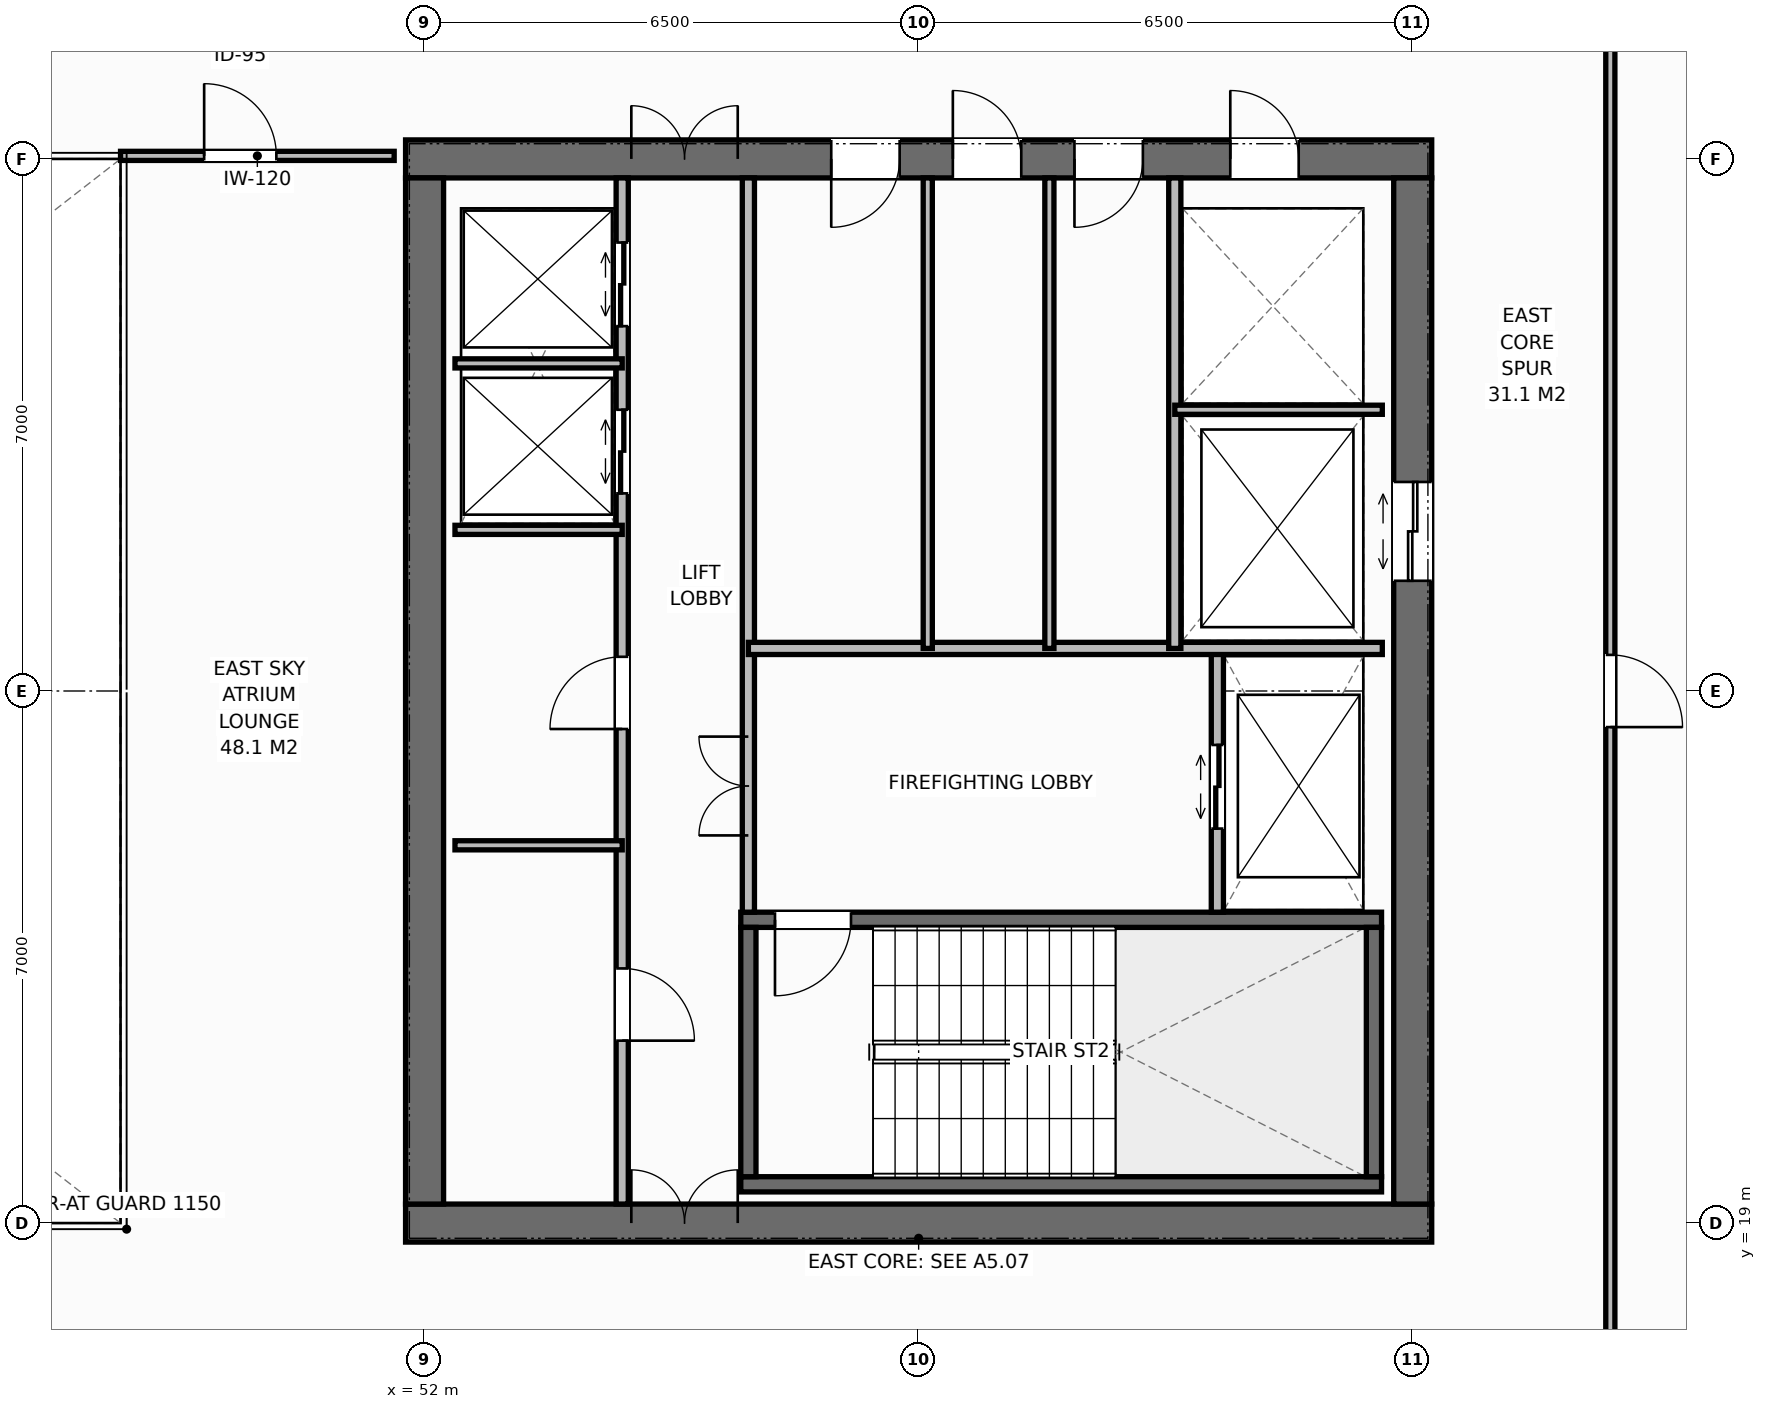
"""IFC4 building model, lengths in metres.
Left out: names, types, materials, properties, quantities, classifications, styles, units other than length and angle.
Written with IfcOpenShell. Run it as: python <this file> out.ifc"""

import sys

from ifc_helpers import new_model, si_unit, direction, frame, frame_2d, origin, place, context, subcontext, project, spatial, rectangle, extrude, element, fill, save


model = new_model("IFC4")
c1 = context("Model", 3, precision=1e-05, world=origin(), true_north=direction((0.0, 1.0)))
c2 = subcontext(c1, "Body", "Model", "MODEL_VIEW")
j1 = project(units=[si_unit("LENGTHUNIT", "METRE"), si_unit("PLANEANGLEUNIT", "RADIAN")], contexts=[c1])
p1 = place(None, origin())
s1 = spatial("IfcSite", under=j1, at=p1, CompositionType="ELEMENT")
p2 = place(p1, origin())
s2 = spatial("IfcBuilding", under=s1, at=p2, CompositionType="ELEMENT")
p3 = place(p2, frame((0.0, 0.0, 278.4)))
s3 = spatial("IfcBuildingStorey", under=s2, at=p3, CompositionType="ELEMENT", Elevation=278.4)
p4 = place(p3, frame((51.75, 19.0, 0.0), z_axis=(0.0, 0.0, 1.0), x_axis=(1.0, 0.0, 0.0)))
e1 = element("IfcWall", 1, at=p4, inside=s3, PredefinedType="SHEAR", context=c2, shape_type="SweptSolid", body=[
    extrude(rectangle(XDim=13.5, YDim=0.5, at=frame_2d((6.75, 0.0))), origin(), (0.0, 0.0, 1.0), 4.0),
])
p5 = place(p4, frame((2.97, 0.0, 0.0)))
e2 = element("IfcOpeningElement", 2, at=p5, cuts=e1, PredefinedType="OPENING", context=c2, shape_type="SweptSolid", body=[
    extrude(rectangle(XDim=1.4, YDim=2.2, at=frame_2d((0.7, 1.1))), frame((0.0, 0.26, 0.0), z_axis=(0.0, -1.0, 0.0), x_axis=(1.0, 0.0, 0.0)), (0.0, 0.0, 1.0), 0.52),
])
p6 = place(p3, frame((51.75, 33.0, 0.0), z_axis=(0.0, 0.0, 1.0), x_axis=(1.0, 0.0, 0.0)))
e3 = element("IfcWall", 3, at=p6, inside=s3, PredefinedType="SHEAR", context=c2, shape_type="SweptSolid", body=[
    extrude(rectangle(XDim=13.5, YDim=0.5, at=frame_2d((6.75, 0.0))), origin(), (0.0, 0.0, 1.0), 4.0),
])
p7 = place(p6, frame((2.97, 0.0, 0.0)))
e4 = element("IfcOpeningElement", 4, at=p7, cuts=e3, PredefinedType="OPENING", context=c2, shape_type="SweptSolid", body=[
    extrude(rectangle(XDim=1.4, YDim=2.2, at=frame_2d((0.7, 1.1))), frame((0.0, 0.26, 0.0), z_axis=(0.0, -1.0, 0.0), x_axis=(1.0, 0.0, 0.0)), (0.0, 0.0, 1.0), 0.52),
])
p8 = place(p6, frame((10.85, 0.0, 0.0)))
e5 = element("IfcOpeningElement", 5, at=p8, cuts=e3, PredefinedType="OPENING", context=c2, shape_type="SweptSolid", body=[
    extrude(rectangle(XDim=0.9, YDim=2.15, at=frame_2d((0.45, 1.075))), frame((0.0, 0.26, 0.0), z_axis=(0.0, -1.0, 0.0), x_axis=(1.0, 0.0, 0.0)), (0.0, 0.0, 1.0), 0.52),
])
p9 = place(p6, frame((5.6, 0.0, 0.0)))
e6 = element("IfcOpeningElement", 6, at=p9, cuts=e3, PredefinedType="OPENING", context=c2, shape_type="SweptSolid", body=[
    extrude(rectangle(XDim=0.9, YDim=2.15, at=frame_2d((0.45, 1.075))), frame((0.0, 0.26, 0.0), z_axis=(0.0, -1.0, 0.0), x_axis=(1.0, 0.0, 0.0)), (0.0, 0.0, 1.0), 0.52),
])
p10 = place(p6, frame((7.2, 0.0, 0.0)))
e7 = element("IfcOpeningElement", 7, at=p10, cuts=e3, PredefinedType="OPENING", context=c2, shape_type="SweptSolid", body=[
    extrude(rectangle(XDim=0.9, YDim=2.15, at=frame_2d((0.45, 1.075))), frame((0.0, 0.26, 0.0), z_axis=(0.0, -1.0, 0.0), x_axis=(1.0, 0.0, 0.0)), (0.0, 0.0, 1.0), 0.52),
])
p11 = place(p6, frame((8.8, 0.0, 0.0)))
e8 = element("IfcOpeningElement", 8, at=p11, cuts=e3, PredefinedType="OPENING", context=c2, shape_type="SweptSolid", body=[
    extrude(rectangle(XDim=0.9, YDim=2.15, at=frame_2d((0.45, 1.075))), frame((0.0, 0.26, 0.0), z_axis=(0.0, -1.0, 0.0), x_axis=(1.0, 0.0, 0.0)), (0.0, 0.0, 1.0), 0.52),
])
p12 = place(p3, frame((52.0, 19.25, 0.0), z_axis=(0.0, 0.0, 1.0), x_axis=(0.0, 1.0, 0.0)))
e9 = element("IfcWall", 9, at=p12, inside=s3, PredefinedType="SHEAR", context=c2, shape_type="SweptSolid", body=[
    extrude(rectangle(XDim=13.5, YDim=0.5, at=frame_2d((6.75, 0.0))), origin(), (0.0, 0.0, 1.0), 4.0),
])
p13 = place(p3, frame((65.0, 19.25, 0.0), z_axis=(0.0, 0.0, 1.0), x_axis=(0.0, 1.0, 0.0)))
e10 = element("IfcWall", 10, at=p13, inside=s3, PredefinedType="SHEAR", context=c2, shape_type="SweptSolid", body=[
    extrude(rectangle(XDim=13.5, YDim=0.5, at=frame_2d((6.75, 0.0))), origin(), (0.0, 0.0, 1.0), 4.0),
])
p14 = place(p13, frame((8.2, 0.0, 0.0)))
e11 = element("IfcOpeningElement", 11, at=p14, cuts=e10, PredefinedType="OPENING", context=c2, shape_type="SweptSolid", body=[
    extrude(rectangle(XDim=1.3, YDim=2.2, at=frame_2d((0.65, 1.1))), frame((0.0, 0.26, 0.0), z_axis=(0.0, -1.0, 0.0), x_axis=(1.0, 0.0, 0.0)), (0.0, 0.0, 1.0), 0.52),
])
p15 = place(p3, frame((56.16, 19.51, 0.0), z_axis=(0.0, 0.0, 1.0), x_axis=(1.0, 0.0, 0.0)))
e12 = element("IfcWall", 12, at=p15, inside=s3, PredefinedType="SHEAR", context=c2, shape_type="SweptSolid", body=[
    extrude(rectangle(XDim=8.43, YDim=0.2, at=frame_2d((4.215, 0.0))), origin(), (0.0, 0.0, 1.0), 4.0),
])
p16 = place(p3, frame((56.16, 22.99, 0.0), z_axis=(0.0, 0.0, 1.0), x_axis=(1.0, 0.0, 0.0)))
e13 = element("IfcWall", 13, at=p16, inside=s3, PredefinedType="SHEAR", context=c2, shape_type="SweptSolid", body=[
    extrude(rectangle(XDim=8.43, YDim=0.2, at=frame_2d((4.215, 0.0))), origin(), (0.0, 0.0, 1.0), 4.0),
])
p17 = place(p16, frame((0.45, 0.0, 0.0)))
e14 = element("IfcOpeningElement", 14, at=p17, cuts=e13, PredefinedType="OPENING", context=c2, shape_type="SweptSolid", body=[
    extrude(rectangle(XDim=1.0, YDim=2.15, at=frame_2d((0.5, 1.075))), frame((0.0, 0.11, 0.0), z_axis=(0.0, -1.0, 0.0), x_axis=(1.0, 0.0, 0.0)), (0.0, 0.0, 1.0), 0.22),
])
for number, where, z_axis, x_axis in (
    (15, (56.26, 19.61, 0.0), (0.0, 0.0, 1.0), (0.0, 1.0, 0.0)),
    (16, (64.49, 19.61, 0.0), (0.0, 0.0, 1.0), (0.0, 1.0, 0.0)),
):
    element("IfcWall", number, at=place(p3, frame(where, z_axis=z_axis, x_axis=x_axis)), inside=s3, PredefinedType="SHEAR", context=c2, shape_type="SweptSolid", body=[
        extrude(rectangle(XDim=3.28, YDim=0.2, at=frame_2d((1.64, 0.0))), origin(), (0.0, 0.0, 1.0), 4.0),
    ])
p18 = place(p3, frame((54.6, 19.25, 0.0), z_axis=(0.0, 0.0, 1.0), x_axis=(0.0, 1.0, 0.0)))
e17 = element("IfcWall", 17, at=p18, inside=s3, PredefinedType="STANDARD", context=c2, shape_type="SweptSolid", body=[
    extrude(rectangle(XDim=13.5, YDim=0.16, at=frame_2d((6.75, 0.0))), origin(), (0.0, 0.0, 1.0), 3.788),
])
p19 = place(p18, frame((2.15, 0.0, 0.0)))
e18 = element("IfcOpeningElement", 18, at=p19, cuts=e17, PredefinedType="OPENING", context=c2, shape_type="SweptSolid", body=[
    extrude(rectangle(XDim=0.95, YDim=2.15, at=frame_2d((0.475, 1.075))), frame((0.0, 0.09, 0.0), z_axis=(0.0, -1.0, 0.0), x_axis=(1.0, 0.0, 0.0)), (0.0, 0.0, 1.0), 0.18),
])
p20 = place(p18, frame((6.25, 0.0, 0.0)))
e19 = element("IfcOpeningElement", 19, at=p20, cuts=e17, PredefinedType="OPENING", context=c2, shape_type="SweptSolid", body=[
    extrude(rectangle(XDim=0.95, YDim=2.15, at=frame_2d((0.475, 1.075))), frame((0.0, 0.09, 0.0), z_axis=(0.0, -1.0, 0.0), x_axis=(1.0, 0.0, 0.0)), (0.0, 0.0, 1.0), 0.18),
])
p21 = place(p18, frame((9.35, 0.0, 0.0)))
e20 = element("IfcOpeningElement", 20, at=p21, cuts=e17, PredefinedType="OPENING", context=c2, shape_type="SweptSolid", body=[
    extrude(rectangle(XDim=1.1, YDim=2.2, at=frame_2d((0.55, 1.1))), frame((0.0, 0.09, 0.0), z_axis=(0.0, -1.0, 0.0), x_axis=(1.0, 0.0, 0.0)), (0.0, 0.0, 1.0), 0.18),
])
p22 = place(p18, frame((11.55, 0.0, 0.0)))
e21 = element("IfcOpeningElement", 21, at=p22, cuts=e17, PredefinedType="OPENING", context=c2, shape_type="SweptSolid", body=[
    extrude(rectangle(XDim=1.1, YDim=2.2, at=frame_2d((0.55, 1.1))), frame((0.0, 0.09, 0.0), z_axis=(0.0, -1.0, 0.0), x_axis=(1.0, 0.0, 0.0)), (0.0, 0.0, 1.0), 0.18),
])
p23 = place(p3, frame((56.26, 23.09, 0.0), z_axis=(0.0, 0.0, 1.0), x_axis=(0.0, 1.0, 0.0)))
e22 = element("IfcWall", 22, at=p23, inside=s3, PredefinedType="STANDARD", context=c2, shape_type="SweptSolid", body=[
    extrude(rectangle(XDim=9.66, YDim=0.16, at=frame_2d((4.83, 0.0))), origin(), (0.0, 0.0, 1.0), 3.788),
])
p24 = place(p23, frame((1.01, 0.0, 0.0)))
e23 = element("IfcOpeningElement", 23, at=p24, cuts=e22, PredefinedType="OPENING", context=c2, shape_type="SweptSolid", body=[
    extrude(rectangle(XDim=1.3, YDim=2.2, at=frame_2d((0.65, 1.1))), frame((0.0, 0.09, 0.0), z_axis=(0.0, -1.0, 0.0), x_axis=(1.0, 0.0, 0.0)), (0.0, 0.0, 1.0), 0.18),
])
for number, where, z_axis, x_axis in (
    (24, (52.4, 23.97, 0.0), (0.0, 0.0, 1.0), (1.0, 0.0, 0.0)),
    (25, (52.4, 28.12, 0.0), (0.0, 0.0, 1.0), (1.0, 0.0, 0.0)),
    (26, (52.4, 30.31, 0.0), (0.0, 0.0, 1.0), (1.0, 0.0, 0.0)),
):
    element("IfcWall", number, at=place(p3, frame(where, z_axis=z_axis, x_axis=x_axis)), inside=s3, PredefinedType="PARTITIONING", context=c2, shape_type="SweptSolid", body=[
        extrude(rectangle(XDim=2.2, YDim=0.12, at=frame_2d((1.1, 0.0))), origin(), (0.0, 0.0, 1.0), 3.788),
    ])
p25 = place(p3, frame((62.43, 23.09, 0.0), z_axis=(0.0, 0.0, 1.0), x_axis=(0.0, 1.0, 0.0)))
e27 = element("IfcWall", 27, at=p25, inside=s3, PredefinedType="STANDARD", context=c2, shape_type="SweptSolid", body=[
    extrude(rectangle(XDim=3.47, YDim=0.16, at=frame_2d((1.735, 0.0))), origin(), (0.0, 0.0, 1.0), 3.788),
])
p26 = place(p25, frame((1.1, 0.0, 0.0)))
e28 = element("IfcOpeningElement", 28, at=p26, cuts=e27, PredefinedType="OPENING", context=c2, shape_type="SweptSolid", body=[
    extrude(rectangle(XDim=1.1, YDim=2.2, at=frame_2d((0.55, 1.1))), frame((0.0, 0.09, 0.0), z_axis=(0.0, -1.0, 0.0), x_axis=(1.0, 0.0, 0.0)), (0.0, 0.0, 1.0), 0.18),
])
p27 = place(p3, frame((56.26, 26.56, 0.0), z_axis=(0.0, 0.0, 1.0), x_axis=(1.0, 0.0, 0.0)))
e29 = element("IfcWall", 29, at=p27, inside=s3, PredefinedType="STANDARD", context=c2, shape_type="SweptSolid", body=[
    extrude(rectangle(XDim=8.34, YDim=0.16, at=frame_2d((4.17, 0.0))), origin(), (0.0, 0.0, 1.0), 3.788),
])
p28 = place(p3, frame((61.87, 26.56, 0.0), z_axis=(0.0, 0.0, 1.0), x_axis=(0.0, 1.0, 0.0)))
e30 = element("IfcWall", 30, at=p28, inside=s3, PredefinedType="STANDARD", context=c2, shape_type="SweptSolid", body=[
    extrude(rectangle(XDim=6.19, YDim=0.16, at=frame_2d((3.095, 0.0))), origin(), (0.0, 0.0, 1.0), 3.788),
])
p29 = place(p3, frame((61.87, 29.7, 0.0), z_axis=(0.0, 0.0, 1.0), x_axis=(1.0, 0.0, 0.0)))
e31 = element("IfcWall", 31, at=p29, inside=s3, PredefinedType="PARTITIONING", context=c2, shape_type="SweptSolid", body=[
    extrude(rectangle(XDim=2.73, YDim=0.12, at=frame_2d((1.365, 0.0))), origin(), (0.0, 0.0, 1.0), 3.788),
])
for number, where, z_axis, x_axis in (
    (32, (58.62, 26.56, 0.0), (0.0, 0.0, 1.0), (0.0, 1.0, 0.0)),
    (33, (60.22, 26.56, 0.0), (0.0, 0.0, 1.0), (0.0, 1.0, 0.0)),
):
    element("IfcWall", number, at=place(p3, frame(where, z_axis=z_axis, x_axis=x_axis)), inside=s3, PredefinedType="PARTITIONING", context=c2, shape_type="SweptSolid", body=[
        extrude(rectangle(XDim=6.19, YDim=0.12, at=frame_2d((3.095, 0.0))), origin(), (0.0, 0.0, 1.0), 3.788),
    ])
p30 = place(p3, frame((48.0, 33.04, 0.0), z_axis=(0.0, 0.0, 1.0), x_axis=(1.0, 0.0, 0.0)))
e34 = element("IfcWall", 34, at=p30, inside=s3, PredefinedType="PARTITIONING", context=c2, shape_type="SweptSolid", body=[
    extrude(rectangle(XDim=3.6, YDim=0.12, at=frame_2d((1.8, 0.0))), origin(), (0.0, 0.0, 1.0), 3.528),
])
p31 = place(p30, frame((1.1, 0.0, 0.0)))
e35 = element("IfcOpeningElement", 35, at=p31, cuts=e34, PredefinedType="OPENING", context=c2, shape_type="SweptSolid", body=[
    extrude(rectangle(XDim=0.95, YDim=2.15, at=frame_2d((0.475, 1.075))), frame((0.0, 0.07, 0.0), z_axis=(0.0, -1.0, 0.0), x_axis=(1.0, 0.0, 0.0)), (0.0, 0.0, 1.0), 0.14),
])
p32 = place(p3, frame((67.6, 16.5, 0.0), z_axis=(0.0, 0.0, 1.0), x_axis=(0.0, 1.0, 0.0)))
e36 = element("IfcWall", 36, at=p32, inside=s3, PredefinedType="PARTITIONING", context=c2, shape_type="SweptSolid", body=[
    extrude(rectangle(XDim=19.0, YDim=0.12, at=frame_2d((9.5, 0.0))), origin(), (0.0, 0.0, 1.0), 3.788),
])
p33 = place(p32, frame((9.025, 0.0, 0.0)))
e37 = element("IfcOpeningElement", 37, at=p33, cuts=e36, PredefinedType="OPENING", context=c2, shape_type="SweptSolid", body=[
    extrude(rectangle(XDim=0.95, YDim=2.15, at=frame_2d((0.475, 1.075))), frame((0.0, 0.07, 0.0), z_axis=(0.0, -1.0, 0.0), x_axis=(1.0, 0.0, 0.0)), (0.0, 0.0, 1.0), 0.14),
])
p34 = place(p5, origin())
e38 = element("IfcDoor", 38, at=p34, inside=s3, OperationType="DOUBLE_DOOR_SINGLE_SWING", PredefinedType="DOOR", context=c2, shape_type="SweptSolid", body=[
    extrude(rectangle(XDim=1.4, YDim=2.2, at=frame_2d((0.7, 1.1))), frame((0.0, 0.075, 0.0), z_axis=(0.0, -1.0, 0.0), x_axis=(1.0, 0.0, 0.0)), (0.0, 0.0, 1.0), 0.05),
])
fill(e2, e38)
p35 = place(p7, origin())
e39 = element("IfcDoor", 39, at=p35, inside=s3, OperationType="DOUBLE_DOOR_SINGLE_SWING", PredefinedType="DOOR", context=c2, shape_type="SweptSolid", body=[
    extrude(rectangle(XDim=1.4, YDim=2.2, at=frame_2d((0.7, 1.1))), frame((0.0, -0.025, 0.0), z_axis=(0.0, -1.0, 0.0), x_axis=(1.0, 0.0, 0.0)), (0.0, 0.0, 1.0), 0.05),
])
fill(e4, e39)
p36 = place(p19, origin())
e40 = element("IfcDoor", 40, at=p36, inside=s3, OperationType="SINGLE_SWING_RIGHT", PredefinedType="DOOR", context=c2, shape_type="SweptSolid", body=[
    extrude(rectangle(XDim=0.95, YDim=2.15, at=frame_2d((0.475, 1.075))), frame((0.0, 0.025, 0.0), z_axis=(0.0, -1.0, 0.0), x_axis=(1.0, 0.0, 0.0)), (0.0, 0.0, 1.0), 0.05),
])
fill(e18, e40)
p37 = place(p20, origin())
e41 = element("IfcDoor", 41, at=p37, inside=s3, OperationType="SINGLE_SWING_LEFT", PredefinedType="DOOR", context=c2, shape_type="SweptSolid", body=[
    extrude(rectangle(XDim=0.95, YDim=2.15, at=frame_2d((0.475, 1.075))), frame((0.0, 0.025, 0.0), z_axis=(0.0, -1.0, 0.0), x_axis=(1.0, 0.0, 0.0)), (0.0, 0.0, 1.0), 0.05),
])
fill(e19, e41)
p38 = place(p21, origin())
e42 = element("IfcDoor", 42, at=p38, inside=s3, OperationType="DOUBLE_DOOR_SLIDING", PredefinedType="DOOR", context=c2, shape_type="SweptSolid", body=[
    extrude(rectangle(XDim=1.1, YDim=2.2, at=frame_2d((0.55, 1.1))), frame((0.0, 0.025, 0.0), z_axis=(0.0, -1.0, 0.0), x_axis=(1.0, 0.0, 0.0)), (0.0, 0.0, 1.0), 0.05),
])
fill(e20, e42)
p39 = place(p22, origin())
e43 = element("IfcDoor", 43, at=p39, inside=s3, OperationType="DOUBLE_DOOR_SLIDING", PredefinedType="DOOR", context=c2, shape_type="SweptSolid", body=[
    extrude(rectangle(XDim=1.1, YDim=2.2, at=frame_2d((0.55, 1.1))), frame((0.0, 0.025, 0.0), z_axis=(0.0, -1.0, 0.0), x_axis=(1.0, 0.0, 0.0)), (0.0, 0.0, 1.0), 0.05),
])
fill(e21, e43)
p40 = place(p17, origin())
e44 = element("IfcDoor", 44, at=p40, inside=s3, OperationType="SINGLE_SWING_RIGHT", PredefinedType="DOOR", context=c2, shape_type="SweptSolid", body=[
    extrude(rectangle(XDim=1.0, YDim=2.15, at=frame_2d((0.5, 1.075))), frame((0.0, 0.025, 0.0), z_axis=(0.0, -1.0, 0.0), x_axis=(1.0, 0.0, 0.0)), (0.0, 0.0, 1.0), 0.05),
])
fill(e14, e44)
p41 = place(p26, origin())
e45 = element("IfcDoor", 45, at=p41, inside=s3, OperationType="DOUBLE_DOOR_SLIDING", PredefinedType="DOOR", context=c2, shape_type="SweptSolid", body=[
    extrude(rectangle(XDim=1.1, YDim=2.2, at=frame_2d((0.55, 1.1))), frame((0.0, 0.025, 0.0), z_axis=(0.0, -1.0, 0.0), x_axis=(1.0, 0.0, 0.0)), (0.0, 0.0, 1.0), 0.05),
])
fill(e28, e45)
p42 = place(p24, origin())
e46 = element("IfcDoor", 46, at=p42, inside=s3, OperationType="DOUBLE_DOOR_SINGLE_SWING", PredefinedType="DOOR", context=c2, shape_type="SweptSolid", body=[
    extrude(rectangle(XDim=1.3, YDim=2.2, at=frame_2d((0.65, 1.1))), frame((0.0, 0.025, 0.0), z_axis=(0.0, -1.0, 0.0), x_axis=(1.0, 0.0, 0.0)), (0.0, 0.0, 1.0), 0.05),
])
fill(e23, e46)
p43 = place(p14, origin())
e47 = element("IfcDoor", 47, at=p43, inside=s3, OperationType="DOUBLE_DOOR_SLIDING", PredefinedType="DOOR", context=c2, shape_type="SweptSolid", body=[
    extrude(rectangle(XDim=1.3, YDim=2.2, at=frame_2d((0.65, 1.1))), frame((0.0, 0.025, 0.0), z_axis=(0.0, -1.0, 0.0), x_axis=(1.0, 0.0, 0.0)), (0.0, 0.0, 1.0), 0.05),
])
fill(e11, e47)
p44 = place(p8, origin())
e48 = element("IfcDoor", 48, at=p44, inside=s3, OperationType="SINGLE_SWING_LEFT", PredefinedType="DOOR", context=c2, shape_type="SweptSolid", body=[
    extrude(rectangle(XDim=0.9, YDim=2.15, at=frame_2d((0.45, 1.075))), frame((0.0, -0.025, 0.0), z_axis=(0.0, -1.0, 0.0), x_axis=(1.0, 0.0, 0.0)), (0.0, 0.0, 1.0), 0.05),
])
fill(e5, e48)
p45 = place(p9, origin())
e49 = element("IfcDoor", 49, at=p45, inside=s3, OperationType="SINGLE_SWING_RIGHT", PredefinedType="DOOR", context=c2, shape_type="SweptSolid", body=[
    extrude(rectangle(XDim=0.9, YDim=2.15, at=frame_2d((0.45, 1.075))), frame((0.0, -0.025, 0.0), z_axis=(0.0, -1.0, 0.0), x_axis=(1.0, 0.0, 0.0)), (0.0, 0.0, 1.0), 0.05),
])
fill(e6, e49)
p46 = place(p10, origin())
e50 = element("IfcDoor", 50, at=p46, inside=s3, OperationType="SINGLE_SWING_LEFT", PredefinedType="DOOR", context=c2, shape_type="SweptSolid", body=[
    extrude(rectangle(XDim=0.9, YDim=2.15, at=frame_2d((0.45, 1.075))), frame((0.0, -0.025, 0.0), z_axis=(0.0, -1.0, 0.0), x_axis=(1.0, 0.0, 0.0)), (0.0, 0.0, 1.0), 0.05),
])
fill(e7, e50)
p47 = place(p11, origin())
e51 = element("IfcDoor", 51, at=p47, inside=s3, OperationType="SINGLE_SWING_RIGHT", PredefinedType="DOOR", context=c2, shape_type="SweptSolid", body=[
    extrude(rectangle(XDim=0.9, YDim=2.15, at=frame_2d((0.45, 1.075))), frame((0.0, -0.025, 0.0), z_axis=(0.0, -1.0, 0.0), x_axis=(1.0, 0.0, 0.0)), (0.0, 0.0, 1.0), 0.05),
])
fill(e8, e51)
p48 = place(p31, origin())
e52 = element("IfcDoor", 52, at=p48, inside=s3, OperationType="SINGLE_SWING_LEFT", PredefinedType="DOOR", context=c2, shape_type="SweptSolid", body=[
    extrude(rectangle(XDim=0.95, YDim=2.15, at=frame_2d((0.475, 1.075))), frame((0.0, 0.025, 0.0), z_axis=(0.0, -1.0, 0.0), x_axis=(1.0, 0.0, 0.0)), (0.0, 0.0, 1.0), 0.05),
])
fill(e35, e52)
p49 = place(p33, origin())
e53 = element("IfcDoor", 53, at=p49, inside=s3, OperationType="SINGLE_SWING_RIGHT", PredefinedType="DOOR", context=c2, shape_type="SweptSolid", body=[
    extrude(rectangle(XDim=0.95, YDim=2.15, at=frame_2d((0.475, 1.075))), frame((0.0, 0.025, 0.0), z_axis=(0.0, -1.0, 0.0), x_axis=(1.0, 0.0, 0.0)), (0.0, 0.0, 1.0), 0.05),
])
fill(e37, e53)
save(model, sys.argv[1])
